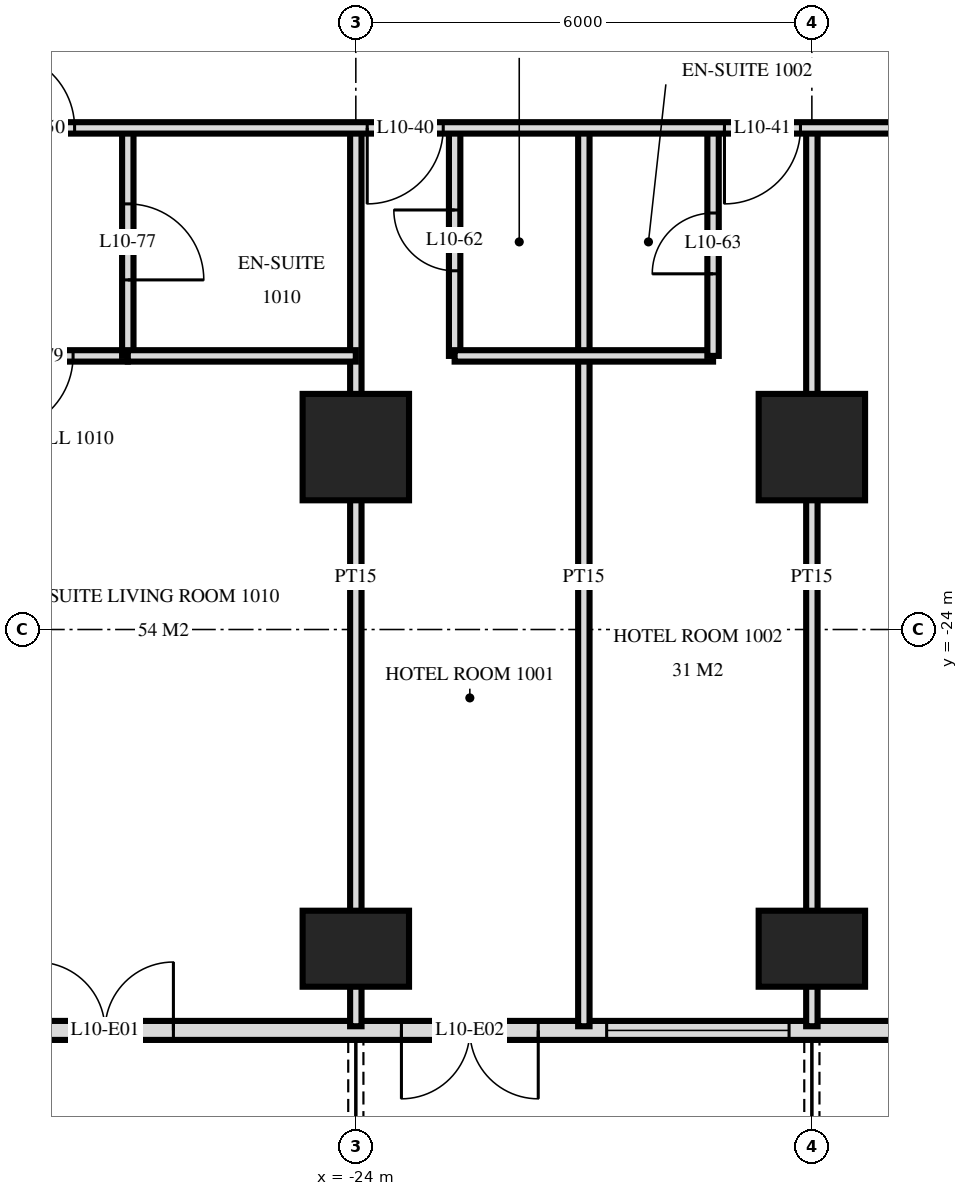
"""IFC4 building model, lengths in metres.
Left out: names, types, materials, properties, quantities, classifications, styles, units other than length and angle.
Written with IfcOpenShell. Run it as: python <this file> out.ifc"""

import sys

from ifc_helpers import new_model, si_unit, direction, frame, frame_2d, origin, origin_2d, place, context, subcontext, project, spatial, rectangle, extrude, element, fill, save


model = new_model("IFC4")
c1 = context("Model", 3, precision=1e-05, world=origin(), true_north=direction((0.0, 1.0)))
c2 = subcontext(c1, "Body", "Model", "MODEL_VIEW")
j1 = project(units=[si_unit("LENGTHUNIT", "METRE"), si_unit("PLANEANGLEUNIT", "RADIAN")], contexts=[c1])
p1 = place(None, origin())
s1 = spatial("IfcSite", under=j1, at=p1, CompositionType="ELEMENT")
p2 = place(p1, origin())
s2 = spatial("IfcBuilding", under=s1, at=p2, CompositionType="ELEMENT")
p3 = place(p2, frame((0.0, 0.0, 45.6)))
s3 = spatial("IfcBuildingStorey", under=s2, at=p3, CompositionType="ELEMENT", Elevation=45.6)
p4 = place(p3, frame((-24.0, -28.2, 0.0), z_axis=(0.0, 0.0, 1.0), x_axis=(1.0, 0.0, 0.0)))
e1 = element("IfcColumn", 1, at=p4, inside=s3, PredefinedType="COLUMN", context=c2, shape_type="SweptSolid", body=[
    extrude(rectangle(XDim=1.4, YDim=1.0, at=origin_2d()), origin(), (0.0, 0.0, 1.0), 3.6),
])
p5 = place(p3, frame((-24.0, -21.6, 0.0), z_axis=(0.0, 0.0, 1.0), x_axis=(1.0, 0.0, 0.0)))
e2 = element("IfcColumn", 2, at=p5, inside=s3, PredefinedType="COLUMN", context=c2, shape_type="SweptSolid", body=[
    extrude(rectangle(XDim=1.4, YDim=1.4, at=origin_2d()), origin(), (0.0, 0.0, 1.0), 3.6),
])
p6 = place(p3, frame((-18.0, -28.2, 0.0), z_axis=(0.0, 0.0, 1.0), x_axis=(1.0, 0.0, 0.0)))
e3 = element("IfcColumn", 3, at=p6, inside=s3, PredefinedType="COLUMN", context=c2, shape_type="SweptSolid", body=[
    extrude(rectangle(XDim=1.4, YDim=1.0, at=origin_2d()), origin(), (0.0, 0.0, 1.0), 3.6),
])
p7 = place(p3, frame((-18.0, -21.6, 0.0), z_axis=(0.0, 0.0, 1.0), x_axis=(1.0, 0.0, 0.0)))
e4 = element("IfcColumn", 4, at=p7, inside=s3, PredefinedType="COLUMN", context=c2, shape_type="SweptSolid", body=[
    extrude(rectangle(XDim=1.4, YDim=1.4, at=origin_2d()), origin(), (0.0, 0.0, 1.0), 3.6),
])
p8 = place(p3, frame((-28.775, -29.275, 0.0), z_axis=(0.0, 0.0, 1.0), x_axis=(1.0, 0.0, 0.0)))
e5 = element("IfcWall", 5, at=p8, inside=s3, PredefinedType="SOLIDWALL", context=c2, shape_type="SweptSolid", body=[
    extrude(rectangle(XDim=57.551, YDim=0.25, at=frame_2d((28.775, 0.0))), origin(), (0.0, 0.0, 1.0), 3.32),
])
p9 = place(p8, frame((0.575, 0.0, 0.0)))
e6 = element("IfcOpeningElement", 6, at=p9, cuts=e5, PredefinedType="OPENING", context=c2, shape_type="SweptSolid", body=[
    extrude(rectangle(XDim=1.8, YDim=2.4, at=frame_2d((0.9, 1.2))), frame((0.0, 0.135, 0.0), z_axis=(0.0, -1.0, 0.0), x_axis=(1.0, 0.0, 0.0)), (0.0, 0.0, 1.0), 0.27),
])
p10 = place(p8, frame((5.375, 0.0, 0.0)))
e7 = element("IfcOpeningElement", 7, at=p10, cuts=e5, PredefinedType="OPENING", context=c2, shape_type="SweptSolid", body=[
    extrude(rectangle(XDim=1.8, YDim=2.4, at=frame_2d((0.9, 1.2))), frame((0.0, 0.135, 0.0), z_axis=(0.0, -1.0, 0.0), x_axis=(1.0, 0.0, 0.0)), (0.0, 0.0, 1.0), 0.27),
])
p11 = place(p8, frame((8.075, 0.0, 0.3)))
e8 = element("IfcOpeningElement", 8, at=p11, cuts=e5, PredefinedType="OPENING", context=c2, shape_type="SweptSolid", body=[
    extrude(rectangle(XDim=2.4, YDim=2.1, at=frame_2d((1.2, 1.05))), frame((0.0, 0.135, 0.0), z_axis=(0.0, -1.0, 0.0), x_axis=(1.0, 0.0, 0.0)), (0.0, 0.0, 1.0), 0.27),
])
p12 = place(p8, frame((12.875, 0.0, 0.0)))
e9 = element("IfcOpeningElement", 9, at=p12, cuts=e5, PredefinedType="OPENING", context=c2, shape_type="SweptSolid", body=[
    extrude(rectangle(XDim=1.8, YDim=2.4, at=frame_2d((0.9, 1.2))), frame((0.0, 0.135, 0.0), z_axis=(0.0, -1.0, 0.0), x_axis=(1.0, 0.0, 0.0)), (0.0, 0.0, 1.0), 0.27),
])
p13 = place(p8, frame((17.375, 0.0, 0.0)))
e10 = element("IfcOpeningElement", 10, at=p13, cuts=e5, PredefinedType="OPENING", context=c2, shape_type="SweptSolid", body=[
    extrude(rectangle(XDim=1.8, YDim=2.4, at=frame_2d((0.9, 1.2))), frame((0.0, 0.135, 0.0), z_axis=(0.0, -1.0, 0.0), x_axis=(1.0, 0.0, 0.0)), (0.0, 0.0, 1.0), 0.27),
])
p14 = place(p8, frame((20.075, 0.0, 0.3)))
e11 = element("IfcOpeningElement", 11, at=p14, cuts=e5, PredefinedType="OPENING", context=c2, shape_type="SweptSolid", body=[
    extrude(rectangle(XDim=2.4, YDim=2.1, at=frame_2d((1.2, 1.05))), frame((0.0, 0.135, 0.0), z_axis=(0.0, -1.0, 0.0), x_axis=(1.0, 0.0, 0.0)), (0.0, 0.0, 1.0), 0.27),
])
p15 = place(p8, frame((23.075, 0.0, 0.3)))
e12 = element("IfcOpeningElement", 12, at=p15, cuts=e5, PredefinedType="OPENING", context=c2, shape_type="SweptSolid", body=[
    extrude(rectangle(XDim=2.4, YDim=2.1, at=frame_2d((1.2, 1.05))), frame((0.0, 0.135, 0.0), z_axis=(0.0, -1.0, 0.0), x_axis=(1.0, 0.0, 0.0)), (0.0, 0.0, 1.0), 0.27),
])
p16 = place(p8, frame((26.375, 0.0, 0.0)))
e13 = element("IfcOpeningElement", 13, at=p16, cuts=e5, PredefinedType="OPENING", context=c2, shape_type="SweptSolid", body=[
    extrude(rectangle(XDim=1.8, YDim=2.4, at=frame_2d((0.9, 1.2))), frame((0.0, 0.135, 0.0), z_axis=(0.0, -1.0, 0.0), x_axis=(1.0, 0.0, 0.0)), (0.0, 0.0, 1.0), 0.27),
])
p17 = place(p8, frame((29.075, 0.0, 0.3)))
e14 = element("IfcOpeningElement", 14, at=p17, cuts=e5, PredefinedType="OPENING", context=c2, shape_type="SweptSolid", body=[
    extrude(rectangle(XDim=2.4, YDim=2.1, at=frame_2d((1.2, 1.05))), frame((0.0, 0.135, 0.0), z_axis=(0.0, -1.0, 0.0), x_axis=(1.0, 0.0, 0.0)), (0.0, 0.0, 1.0), 0.27),
])
p18 = place(p8, frame((32.375, 0.0, 0.0)))
e15 = element("IfcOpeningElement", 15, at=p18, cuts=e5, PredefinedType="OPENING", context=c2, shape_type="SweptSolid", body=[
    extrude(rectangle(XDim=1.8, YDim=2.4, at=frame_2d((0.9, 1.2))), frame((0.0, 0.135, 0.0), z_axis=(0.0, -1.0, 0.0), x_axis=(1.0, 0.0, 0.0)), (0.0, 0.0, 1.0), 0.27),
])
p19 = place(p8, frame((35.375, 0.0, 0.0)))
e16 = element("IfcOpeningElement", 16, at=p19, cuts=e5, PredefinedType="OPENING", context=c2, shape_type="SweptSolid", body=[
    extrude(rectangle(XDim=1.8, YDim=2.4, at=frame_2d((0.9, 1.2))), frame((0.0, 0.135, 0.0), z_axis=(0.0, -1.0, 0.0), x_axis=(1.0, 0.0, 0.0)), (0.0, 0.0, 1.0), 0.27),
])
p20 = place(p8, frame((38.075, 0.0, 0.3)))
e17 = element("IfcOpeningElement", 17, at=p20, cuts=e5, PredefinedType="OPENING", context=c2, shape_type="SweptSolid", body=[
    extrude(rectangle(XDim=2.4, YDim=2.1, at=frame_2d((1.2, 1.05))), frame((0.0, 0.135, 0.0), z_axis=(0.0, -1.0, 0.0), x_axis=(1.0, 0.0, 0.0)), (0.0, 0.0, 1.0), 0.27),
])
p21 = place(p8, frame((41.075, 0.0, 0.3)))
e18 = element("IfcOpeningElement", 18, at=p21, cuts=e5, PredefinedType="OPENING", context=c2, shape_type="SweptSolid", body=[
    extrude(rectangle(XDim=2.4, YDim=2.1, at=frame_2d((1.2, 1.05))), frame((0.0, 0.135, 0.0), z_axis=(0.0, -1.0, 0.0), x_axis=(1.0, 0.0, 0.0)), (0.0, 0.0, 1.0), 0.27),
])
p22 = place(p8, frame((44.375, 0.0, 0.0)))
e19 = element("IfcOpeningElement", 19, at=p22, cuts=e5, PredefinedType="OPENING", context=c2, shape_type="SweptSolid", body=[
    extrude(rectangle(XDim=1.8, YDim=2.4, at=frame_2d((0.9, 1.2))), frame((0.0, 0.135, 0.0), z_axis=(0.0, -1.0, 0.0), x_axis=(1.0, 0.0, 0.0)), (0.0, 0.0, 1.0), 0.27),
])
p23 = place(p8, frame((47.075, 0.0, 0.3)))
e20 = element("IfcOpeningElement", 20, at=p23, cuts=e5, PredefinedType="OPENING", context=c2, shape_type="SweptSolid", body=[
    extrude(rectangle(XDim=2.4, YDim=2.1, at=frame_2d((1.2, 1.05))), frame((0.0, 0.135, 0.0), z_axis=(0.0, -1.0, 0.0), x_axis=(1.0, 0.0, 0.0)), (0.0, 0.0, 1.0), 0.27),
])
p24 = place(p8, frame((50.375, 0.0, 0.0)))
e21 = element("IfcOpeningElement", 21, at=p24, cuts=e5, PredefinedType="OPENING", context=c2, shape_type="SweptSolid", body=[
    extrude(rectangle(XDim=1.8, YDim=2.4, at=frame_2d((0.9, 1.2))), frame((0.0, 0.135, 0.0), z_axis=(0.0, -1.0, 0.0), x_axis=(1.0, 0.0, 0.0)), (0.0, 0.0, 1.0), 0.27),
])
p25 = place(p8, frame((53.375, 0.0, 0.0)))
e22 = element("IfcOpeningElement", 22, at=p25, cuts=e5, PredefinedType="OPENING", context=c2, shape_type="SweptSolid", body=[
    extrude(rectangle(XDim=1.8, YDim=2.4, at=frame_2d((0.9, 1.2))), frame((0.0, 0.135, 0.0), z_axis=(0.0, -1.0, 0.0), x_axis=(1.0, 0.0, 0.0)), (0.0, 0.0, 1.0), 0.27),
])
p26 = place(p3, frame((-18.0, -29.22, 0.0), z_axis=(0.0, 0.0, 1.0), x_axis=(0.0, 1.0, 0.0)))
e23 = element("IfcWall", 23, at=p26, inside=s3, PredefinedType="PARTITIONING", context=c2, shape_type="SweptSolid", body=[
    extrude(rectangle(XDim=11.82, YDim=0.15, at=frame_2d((5.91, 0.0))), origin(), (0.0, 0.0, 1.0), 3.32),
])
p27 = place(p3, frame((-19.3, -20.4, 0.0), z_axis=(0.0, 0.0, 1.0), x_axis=(0.0, 1.0, 0.0)))
e24 = element("IfcWall", 24, at=p27, inside=s3, PredefinedType="PARTITIONING", context=c2, shape_type="SweptSolid", body=[
    extrude(rectangle(XDim=3.0, YDim=0.15, at=frame_2d((1.5, 0.0))), origin(), (0.0, 0.0, 1.0), 3.32),
])
p28 = place(p27, frame((1.08, 0.0, 0.0)))
e25 = element("IfcOpeningElement", 25, at=p28, cuts=e24, PredefinedType="OPENING", context=c2, shape_type="SweptSolid", body=[
    extrude(rectangle(XDim=0.8, YDim=2.1, at=frame_2d((0.4, 1.05))), frame((0.0, 0.085, 0.0), z_axis=(0.0, -1.0, 0.0), x_axis=(1.0, 0.0, 0.0)), (0.0, 0.0, 1.0), 0.17),
])
p29 = place(p3, frame((-21.0, -29.22, 0.0), z_axis=(0.0, 0.0, 1.0), x_axis=(0.0, 1.0, 0.0)))
e26 = element("IfcWall", 26, at=p29, inside=s3, PredefinedType="PARTITIONING", context=c2, shape_type="SweptSolid", body=[
    extrude(rectangle(XDim=11.82, YDim=0.15, at=frame_2d((5.91, 0.0))), origin(), (0.0, 0.0, 1.0), 3.32),
])
p30 = place(p3, frame((-22.7, -20.4, 0.0), z_axis=(0.0, 0.0, 1.0), x_axis=(0.0, 1.0, 0.0)))
e27 = element("IfcWall", 27, at=p30, inside=s3, PredefinedType="PARTITIONING", context=c2, shape_type="SweptSolid", body=[
    extrude(rectangle(XDim=3.0, YDim=0.15, at=frame_2d((1.5, 0.0))), origin(), (0.0, 0.0, 1.0), 3.32),
])
p31 = place(p30, frame((1.12, 0.0, 0.0)))
e28 = element("IfcOpeningElement", 28, at=p31, cuts=e27, PredefinedType="OPENING", context=c2, shape_type="SweptSolid", body=[
    extrude(rectangle(XDim=0.8, YDim=2.1, at=frame_2d((0.4, 1.05))), frame((0.0, 0.085, 0.0), z_axis=(0.0, -1.0, 0.0), x_axis=(1.0, 0.0, 0.0)), (0.0, 0.0, 1.0), 0.17),
])
p32 = place(p3, frame((-24.0, -29.22, 0.0), z_axis=(0.0, 0.0, 1.0), x_axis=(0.0, 1.0, 0.0)))
e29 = element("IfcWall", 29, at=p32, inside=s3, PredefinedType="PARTITIONING", context=c2, shape_type="SweptSolid", body=[
    extrude(rectangle(XDim=11.82, YDim=0.15, at=frame_2d((5.91, 0.0))), origin(), (0.0, 0.0, 1.0), 3.32),
])
p33 = place(p3, frame((-27.0, -20.4, 0.0), z_axis=(0.0, 0.0, 1.0), x_axis=(0.0, 1.0, 0.0)))
e30 = element("IfcWall", 30, at=p33, inside=s3, PredefinedType="PARTITIONING", context=c2, shape_type="SweptSolid", body=[
    extrude(rectangle(XDim=3.0, YDim=0.15, at=frame_2d((1.5, 0.0))), origin(), (0.0, 0.0, 1.0), 3.32),
])
p34 = place(p33, frame((1.0, 0.0, 0.0)))
e31 = element("IfcOpeningElement", 31, at=p34, cuts=e30, PredefinedType="OPENING", context=c2, shape_type="SweptSolid", body=[
    extrude(rectangle(XDim=1.0, YDim=2.1, at=frame_2d((0.5, 1.05))), frame((0.0, 0.085, 0.0), z_axis=(0.0, -1.0, 0.0), x_axis=(1.0, 0.0, 0.0)), (0.0, 0.0, 1.0), 0.17),
])
p35 = place(p3, frame((-29.4, -20.4, 0.0), z_axis=(0.0, 0.0, 1.0), x_axis=(1.0, 0.0, 0.0)))
e32 = element("IfcWall", 32, at=p35, inside=s3, PredefinedType="PARTITIONING", context=c2, shape_type="SweptSolid", body=[
    extrude(rectangle(XDim=2.4, YDim=0.15, at=frame_2d((1.2, 0.0))), origin(), (0.0, 0.0, 1.0), 3.32),
])
p36 = place(p35, frame((0.68, 0.0, 0.0)))
e33 = element("IfcOpeningElement", 33, at=p36, cuts=e32, PredefinedType="OPENING", context=c2, shape_type="SweptSolid", body=[
    extrude(rectangle(XDim=1.0, YDim=2.1, at=frame_2d((0.5, 1.05))), frame((0.0, 0.085, 0.0), z_axis=(0.0, -1.0, 0.0), x_axis=(1.0, 0.0, 0.0)), (0.0, 0.0, 1.0), 0.17),
])
p37 = place(p3, frame((-27.0, -20.4, 0.0), z_axis=(0.0, 0.0, 1.0), x_axis=(1.0, 0.0, 0.0)))
e34 = element("IfcWall", 34, at=p37, inside=s3, PredefinedType="PARTITIONING", context=c2, shape_type="SweptSolid", body=[
    extrude(rectangle(XDim=3.0, YDim=0.15, at=frame_2d((1.5, 0.0))), origin(), (0.0, 0.0, 1.0), 3.32),
])
p38 = place(p3, frame((-22.7, -20.4, 0.0), z_axis=(0.0, 0.0, 1.0), x_axis=(1.0, 0.0, 0.0)))
e35 = element("IfcWall", 35, at=p38, inside=s3, PredefinedType="PARTITIONING", context=c2, shape_type="SweptSolid", body=[
    extrude(rectangle(XDim=3.4, YDim=0.15, at=frame_2d((1.7, 0.0))), origin(), (0.0, 0.0, 1.0), 3.32),
])
p39 = place(p3, frame((-33.12, -17.4, 0.0), z_axis=(0.0, 0.0, 1.0), x_axis=(1.0, 0.0, 0.0)))
e36 = element("IfcWall", 36, at=p39, inside=s3, PredefinedType="PARTITIONING", context=c2, shape_type="SweptSolid", body=[
    extrude(rectangle(XDim=66.24, YDim=0.15, at=frame_2d((33.12, 0.0))), origin(), (0.0, 0.0, 1.0), 3.32),
])
p40 = place(p39, frame((9.27, 0.0, 0.0)))
e37 = element("IfcOpeningElement", 37, at=p40, cuts=e36, PredefinedType="OPENING", context=c2, shape_type="SweptSolid", body=[
    extrude(rectangle(XDim=1.0, YDim=2.1, at=frame_2d((0.5, 1.05))), frame((0.0, 0.085, 0.0), z_axis=(0.0, -1.0, 0.0), x_axis=(1.0, 0.0, 0.0)), (0.0, 0.0, 1.0), 0.17),
])
p41 = place(p39, frame((13.97, 0.0, 0.0)))
e38 = element("IfcOpeningElement", 38, at=p41, cuts=e36, PredefinedType="OPENING", context=c2, shape_type="SweptSolid", body=[
    extrude(rectangle(XDim=1.0, YDim=2.1, at=frame_2d((0.5, 1.05))), frame((0.0, 0.085, 0.0), z_axis=(0.0, -1.0, 0.0), x_axis=(1.0, 0.0, 0.0)), (0.0, 0.0, 1.0), 0.17),
])
p42 = place(p39, frame((17.62, 0.0, 0.0)))
e39 = element("IfcOpeningElement", 39, at=p42, cuts=e36, PredefinedType="OPENING", context=c2, shape_type="SweptSolid", body=[
    extrude(rectangle(XDim=1.0, YDim=2.1, at=frame_2d((0.5, 1.05))), frame((0.0, 0.085, 0.0), z_axis=(0.0, -1.0, 0.0), x_axis=(1.0, 0.0, 0.0)), (0.0, 0.0, 1.0), 0.17),
])
p43 = place(p39, frame((21.27, 0.0, 0.0)))
e40 = element("IfcOpeningElement", 40, at=p43, cuts=e36, PredefinedType="OPENING", context=c2, shape_type="SweptSolid", body=[
    extrude(rectangle(XDim=1.0, YDim=2.1, at=frame_2d((0.5, 1.05))), frame((0.0, 0.085, 0.0), z_axis=(0.0, -1.0, 0.0), x_axis=(1.0, 0.0, 0.0)), (0.0, 0.0, 1.0), 0.17),
])
p44 = place(p39, frame((25.97, 0.0, 0.0)))
e41 = element("IfcOpeningElement", 41, at=p44, cuts=e36, PredefinedType="OPENING", context=c2, shape_type="SweptSolid", body=[
    extrude(rectangle(XDim=1.0, YDim=2.1, at=frame_2d((0.5, 1.05))), frame((0.0, 0.085, 0.0), z_axis=(0.0, -1.0, 0.0), x_axis=(1.0, 0.0, 0.0)), (0.0, 0.0, 1.0), 0.17),
])
p45 = place(p39, frame((35.62, 0.0, 0.0)))
e42 = element("IfcOpeningElement", 42, at=p45, cuts=e36, PredefinedType="OPENING", context=c2, shape_type="SweptSolid", body=[
    extrude(rectangle(XDim=1.0, YDim=2.1, at=frame_2d((0.5, 1.05))), frame((0.0, 0.085, 0.0), z_axis=(0.0, -1.0, 0.0), x_axis=(1.0, 0.0, 0.0)), (0.0, 0.0, 1.0), 0.17),
])
p46 = place(p39, frame((40.97, 0.0, 0.0)))
e43 = element("IfcOpeningElement", 43, at=p46, cuts=e36, PredefinedType="OPENING", context=c2, shape_type="SweptSolid", body=[
    extrude(rectangle(XDim=1.0, YDim=2.1, at=frame_2d((0.5, 1.05))), frame((0.0, 0.085, 0.0), z_axis=(0.0, -1.0, 0.0), x_axis=(1.0, 0.0, 0.0)), (0.0, 0.0, 1.0), 0.17),
])
p47 = place(p39, frame((42.27, 0.0, 0.0)))
e44 = element("IfcOpeningElement", 44, at=p47, cuts=e36, PredefinedType="OPENING", context=c2, shape_type="SweptSolid", body=[
    extrude(rectangle(XDim=1.0, YDim=2.1, at=frame_2d((0.5, 1.05))), frame((0.0, 0.085, 0.0), z_axis=(0.0, -1.0, 0.0), x_axis=(1.0, 0.0, 0.0)), (0.0, 0.0, 1.0), 0.17),
])
p48 = place(p39, frame((49.72, 0.0, 0.0)))
e45 = element("IfcOpeningElement", 45, at=p48, cuts=e36, PredefinedType="OPENING", context=c2, shape_type="SweptSolid", body=[
    extrude(rectangle(XDim=1.0, YDim=2.1, at=frame_2d((0.5, 1.05))), frame((0.0, 0.085, 0.0), z_axis=(0.0, -1.0, 0.0), x_axis=(1.0, 0.0, 0.0)), (0.0, 0.0, 1.0), 0.17),
])
p49 = place(p39, frame((51.27, 0.0, 0.0)))
e46 = element("IfcOpeningElement", 46, at=p49, cuts=e36, PredefinedType="OPENING", context=c2, shape_type="SweptSolid", body=[
    extrude(rectangle(XDim=1.0, YDim=2.1, at=frame_2d((0.5, 1.05))), frame((0.0, 0.085, 0.0), z_axis=(0.0, -1.0, 0.0), x_axis=(1.0, 0.0, 0.0)), (0.0, 0.0, 1.0), 0.17),
])
p50 = place(p39, frame((4.42, 0.0, 0.0)))
e47 = element("IfcOpeningElement", 47, at=p50, cuts=e36, PredefinedType="OPENING", context=c2, shape_type="SweptSolid", body=[
    extrude(rectangle(XDim=1.0, YDim=2.1, at=frame_2d((0.5, 1.05))), frame((0.0, 0.085, 0.0), z_axis=(0.0, -1.0, 0.0), x_axis=(1.0, 0.0, 0.0)), (0.0, 0.0, 1.0), 0.17),
])
p51 = place(p39, frame((54.82, 0.0, 0.0)))
e48 = element("IfcOpeningElement", 48, at=p51, cuts=e36, PredefinedType="OPENING", context=c2, shape_type="SweptSolid", body=[
    extrude(rectangle(XDim=1.0, YDim=2.1, at=frame_2d((0.5, 1.05))), frame((0.0, 0.085, 0.0), z_axis=(0.0, -1.0, 0.0), x_axis=(1.0, 0.0, 0.0)), (0.0, 0.0, 1.0), 0.17),
])
p52 = place(p9, origin())
e49 = element("IfcDoor", 49, at=p52, inside=s3, OperationType="DOUBLE_DOOR_SINGLE_SWING", PredefinedType="DOOR", context=c2, shape_type="SweptSolid", body=[
    extrude(rectangle(XDim=1.8, YDim=2.4, at=frame_2d((0.9, 1.2))), frame((0.0, 0.025, 0.0), z_axis=(0.0, -1.0, 0.0), x_axis=(1.0, 0.0, 0.0)), (0.0, 0.0, 1.0), 0.05),
])
fill(e6, e49)
p53 = place(p10, frame((0.9, 0.0, 0.0), z_axis=(0.0, 0.0, 1.0), x_axis=(-1.0, 0.0, 0.0)))
e50 = element("IfcDoor", 50, at=p53, inside=s3, OperationType="DOUBLE_DOOR_SINGLE_SWING", PredefinedType="DOOR", context=c2, shape_type="SweptSolid", body=[
    extrude(rectangle(XDim=1.8, YDim=2.4, at=frame_2d((0.0, 1.2))), frame((0.0, -0.025, 0.0), z_axis=(0.0, 1.0, 0.0), x_axis=(-1.0, 0.0, 0.0)), (0.0, 0.0, 1.0), 0.05),
])
fill(e7, e50)
p54 = place(p11, origin())
e51 = element("IfcWindow", 51, at=p54, inside=s3, PartitioningType="SINGLE_PANEL", PredefinedType="WINDOW", context=c2, shape_type="SweptSolid", body=[
    extrude(rectangle(XDim=2.4, YDim=2.1, at=frame_2d((1.2, 1.05))), frame((0.0, 0.03, 0.0), z_axis=(0.0, -1.0, 0.0), x_axis=(1.0, 0.0, 0.0)), (0.0, 0.0, 1.0), 0.06),
])
fill(e8, e51)
p55 = place(p40, frame((0.5, 0.0, 0.0), z_axis=(0.0, 0.0, 1.0), x_axis=(-1.0, 0.0, 0.0)))
e52 = element("IfcDoor", 52, at=p55, inside=s3, OperationType="SINGLE_SWING_LEFT", PredefinedType="DOOR", context=c2, shape_type="SweptSolid", body=[
    extrude(rectangle(XDim=1.0, YDim=2.1, at=frame_2d((0.0, 1.05))), frame((0.0, -0.025, 0.0), z_axis=(0.0, 1.0, 0.0), x_axis=(-1.0, 0.0, 0.0)), (0.0, 0.0, 1.0), 0.05),
])
fill(e37, e52)
p56 = place(p41, frame((0.5, 0.0, 0.0), z_axis=(0.0, 0.0, 1.0), x_axis=(-1.0, 0.0, 0.0)))
e53 = element("IfcDoor", 53, at=p56, inside=s3, OperationType="SINGLE_SWING_LEFT", PredefinedType="DOOR", context=c2, shape_type="SweptSolid", body=[
    extrude(rectangle(XDim=1.0, YDim=2.1, at=frame_2d((0.0, 1.05))), frame((0.0, -0.025, 0.0), z_axis=(0.0, 1.0, 0.0), x_axis=(-1.0, 0.0, 0.0)), (0.0, 0.0, 1.0), 0.05),
])
fill(e38, e53)
p57 = place(p50, origin())
e54 = element("IfcDoor", 54, at=p57, inside=s3, OperationType="SINGLE_SWING_RIGHT", PredefinedType="DOOR", context=c2, shape_type="SweptSolid", body=[
    extrude(rectangle(XDim=1.0, YDim=2.1, at=frame_2d((0.5, 1.05))), frame((0.0, 0.025, 0.0), z_axis=(0.0, -1.0, 0.0), x_axis=(1.0, 0.0, 0.0)), (0.0, 0.0, 1.0), 0.05),
])
fill(e47, e54)
p58 = place(p31, origin())
e55 = element("IfcDoor", 55, at=p58, inside=s3, OperationType="SINGLE_SWING_LEFT", PredefinedType="DOOR", context=c2, shape_type="SweptSolid", body=[
    extrude(rectangle(XDim=0.8, YDim=2.1, at=frame_2d((0.4, 1.05))), frame((0.0, 0.025, 0.0), z_axis=(0.0, -1.0, 0.0), x_axis=(1.0, 0.0, 0.0)), (0.0, 0.0, 1.0), 0.05),
])
fill(e28, e55)
p59 = place(p28, origin())
e56 = element("IfcDoor", 56, at=p59, inside=s3, OperationType="SINGLE_SWING_RIGHT", PredefinedType="DOOR", context=c2, shape_type="SweptSolid", body=[
    extrude(rectangle(XDim=0.8, YDim=2.1, at=frame_2d((0.4, 1.05))), frame((0.0, 0.025, 0.0), z_axis=(0.0, -1.0, 0.0), x_axis=(1.0, 0.0, 0.0)), (0.0, 0.0, 1.0), 0.05),
])
fill(e25, e56)
p60 = place(p34, frame((0.5, 0.0, 0.0), z_axis=(0.0, 0.0, 1.0), x_axis=(-1.0, 0.0, 0.0)))
e57 = element("IfcDoor", 57, at=p60, inside=s3, OperationType="SINGLE_SWING_LEFT", PredefinedType="DOOR", context=c2, shape_type="SweptSolid", body=[
    extrude(rectangle(XDim=1.0, YDim=2.1, at=frame_2d((0.0, 1.05))), frame((0.0, -0.025, 0.0), z_axis=(0.0, 1.0, 0.0), x_axis=(-1.0, 0.0, 0.0)), (0.0, 0.0, 1.0), 0.05),
])
fill(e31, e57)
p61 = place(p36, frame((0.5, 0.0, 0.0), z_axis=(0.0, 0.0, 1.0), x_axis=(-1.0, 0.0, 0.0)))
e58 = element("IfcDoor", 58, at=p61, inside=s3, OperationType="SINGLE_SWING_LEFT", PredefinedType="DOOR", context=c2, shape_type="SweptSolid", body=[
    extrude(rectangle(XDim=1.0, YDim=2.1, at=frame_2d((0.0, 1.05))), frame((0.0, -0.025, 0.0), z_axis=(0.0, 1.0, 0.0), x_axis=(-1.0, 0.0, 0.0)), (0.0, 0.0, 1.0), 0.05),
])
fill(e33, e58)
save(model, sys.argv[1])
